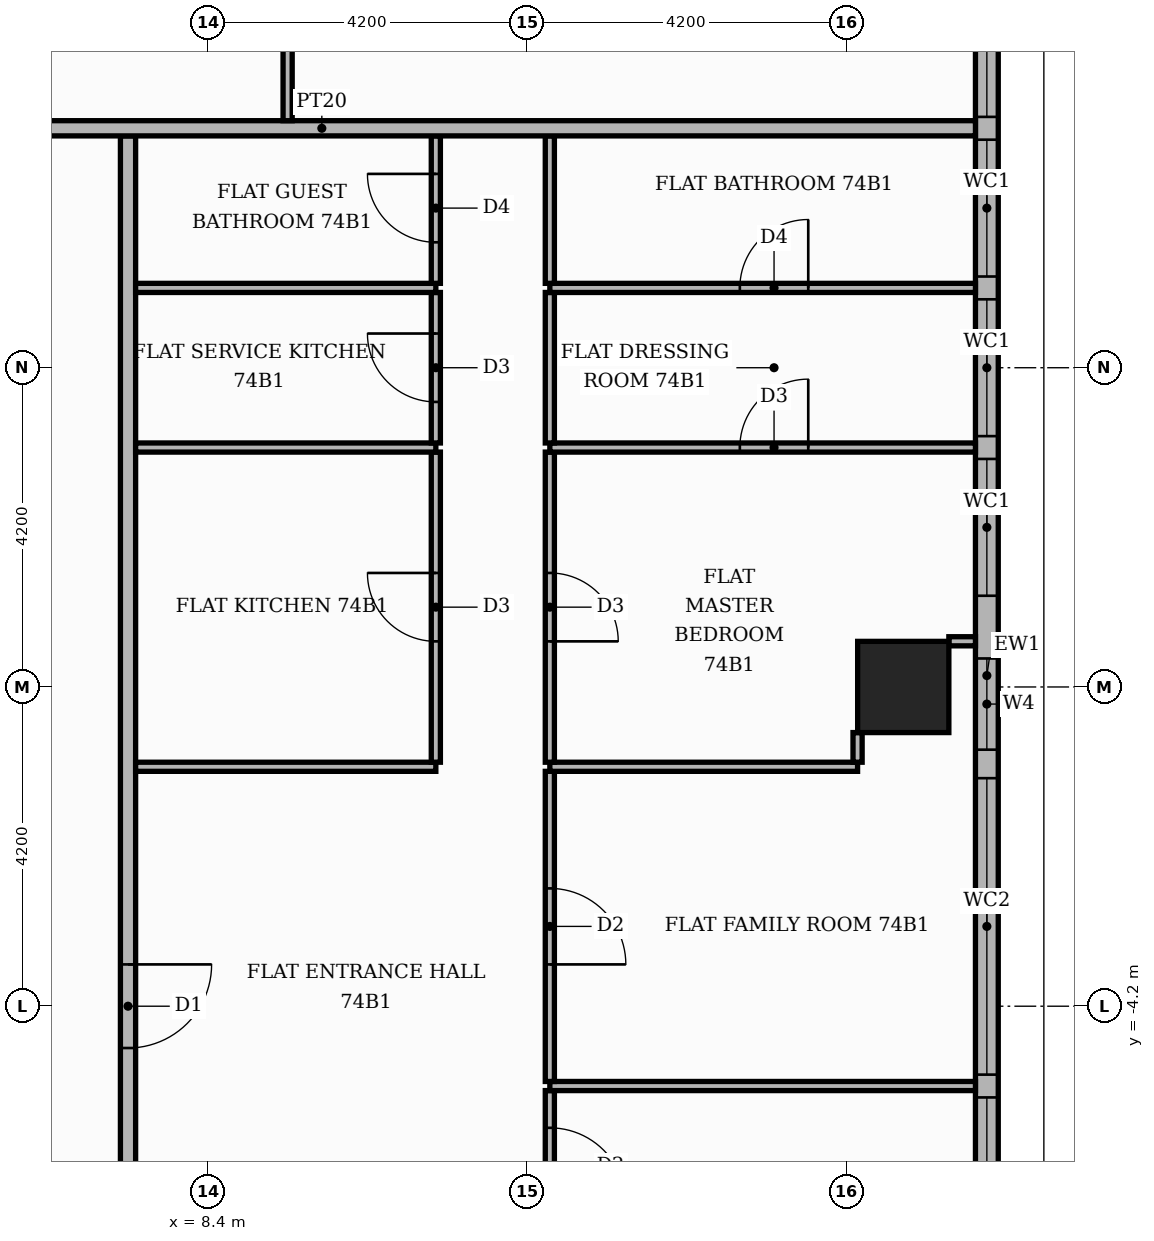
"""IFC4 building model, lengths in metres.
Left out: names, types, materials, properties, quantities, classifications, styles, units other than length and angle.
Written with IfcOpenShell. Run it as: python <this file> out.ifc"""

import sys

from ifc_helpers import new_model, si_unit, direction, frame, frame_2d, origin, origin_2d, place, context, subcontext, project, spatial, rectangle, extrude, element, fill, save


model = new_model("IFC4")
c1 = context("Model", 3, precision=1e-05, world=origin(), true_north=direction((0.0, 1.0)))
c2 = subcontext(c1, "Body", "Model", "MODEL_VIEW")
j1 = project(units=[si_unit("LENGTHUNIT", "METRE"), si_unit("PLANEANGLEUNIT", "RADIAN")], contexts=[c1])
p1 = place(None, origin())
s1 = spatial("IfcSite", under=j1, at=p1, CompositionType="ELEMENT")
p2 = place(p1, origin())
s2 = spatial("IfcBuilding", under=s1, at=p2, CompositionType="ELEMENT")
p3 = place(p2, frame((0.0, 0.0, 308.4)))
s3 = spatial("IfcBuildingStorey", under=s2, at=p3, CompositionType="ELEMENT", Elevation=308.4)
p4 = place(p3, frame((17.55, 0.0, 0.0), z_axis=(0.0, 0.0, 1.0), x_axis=(1.0, 0.0, 0.0)))
e1 = element("IfcColumn", 1, at=p4, inside=s3, PredefinedType="COLUMN", context=c2, shape_type="SweptSolid", body=[
    extrude(rectangle(XDim=1.2, YDim=1.2, at=origin_2d()), origin(), (0.0, 0.0, 1.0), 3.9),
])
p5 = place(p3, frame((18.65, -13.0, 0.0), z_axis=(0.0, 0.0, 1.0), x_axis=(0.0, 1.0, 0.0)))
e2 = element("IfcWall", 2, at=p5, inside=s3, PredefinedType="STANDARD", context=c2, shape_type="SweptSolid", body=[
    extrude(rectangle(XDim=26.3, YDim=0.3, at=frame_2d((13.15, 0.0))), origin(), (0.0, 0.0, 1.0), 3.55),
])
p6 = place(p5, frame((1.6, 0.0, 0.6)))
e3 = element("IfcOpeningElement", 3, at=p6, cuts=e2, PredefinedType="OPENING", context=c2, shape_type="SweptSolid", body=[
    extrude(rectangle(XDim=6.0, YDim=2.4, at=frame_2d((3.0, 1.2))), frame((0.0, 0.16, 0.0), z_axis=(0.0, -1.0, 0.0), x_axis=(1.0, 0.0, 0.0)), (0.0, 0.0, 1.0), 0.32),
])
p7 = place(p5, frame((7.9, 0.0, 0.6)))
e4 = element("IfcOpeningElement", 4, at=p7, cuts=e2, PredefinedType="OPENING", context=c2, shape_type="SweptSolid", body=[
    extrude(rectangle(XDim=3.9, YDim=2.4, at=frame_2d((1.95, 1.2))), frame((0.0, 0.16, 0.0), z_axis=(0.0, -1.0, 0.0), x_axis=(1.0, 0.0, 0.0)), (0.0, 0.0, 1.0), 0.32),
])
p8 = place(p5, frame((14.2, 0.0, 0.6)))
e5 = element("IfcOpeningElement", 5, at=p8, cuts=e2, PredefinedType="OPENING", context=c2, shape_type="SweptSolid", body=[
    extrude(rectangle(XDim=1.8, YDim=2.4, at=frame_2d((0.9, 1.2))), frame((0.0, 0.16, 0.0), z_axis=(0.0, -1.0, 0.0), x_axis=(1.0, 0.0, 0.0)), (0.0, 0.0, 1.0), 0.32),
])
p9 = place(p5, frame((16.3, 0.0, 0.6)))
e6 = element("IfcOpeningElement", 6, at=p9, cuts=e2, PredefinedType="OPENING", context=c2, shape_type="SweptSolid", body=[
    extrude(rectangle(XDim=1.8, YDim=2.4, at=frame_2d((0.9, 1.2))), frame((0.0, 0.16, 0.0), z_axis=(0.0, -1.0, 0.0), x_axis=(1.0, 0.0, 0.0)), (0.0, 0.0, 1.0), 0.32),
])
p10 = place(p5, frame((18.4, 0.0, 0.6)))
e7 = element("IfcOpeningElement", 7, at=p10, cuts=e2, PredefinedType="OPENING", context=c2, shape_type="SweptSolid", body=[
    extrude(rectangle(XDim=1.8, YDim=2.4, at=frame_2d((0.9, 1.2))), frame((0.0, 0.16, 0.0), z_axis=(0.0, -1.0, 0.0), x_axis=(1.0, 0.0, 0.0)), (0.0, 0.0, 1.0), 0.32),
])
p11 = place(p5, frame((20.5, 0.0, 0.6)))
e8 = element("IfcOpeningElement", 8, at=p11, cuts=e2, PredefinedType="OPENING", context=c2, shape_type="SweptSolid", body=[
    extrude(rectangle(XDim=3.9, YDim=2.4, at=frame_2d((1.95, 1.2))), frame((0.0, 0.16, 0.0), z_axis=(0.0, -1.0, 0.0), x_axis=(1.0, 0.0, 0.0)), (0.0, 0.0, 1.0), 0.32),
])
p12 = place(p5, frame((12.175, 0.0, 0.9)))
e9 = element("IfcOpeningElement", 9, at=p12, cuts=e2, PredefinedType="OPENING", context=c2, shape_type="SweptSolid", body=[
    extrude(rectangle(XDim=1.2, YDim=2.1, at=frame_2d((0.6, 1.05))), frame((0.0, 0.16, 0.0), z_axis=(0.0, -1.0, 0.0), x_axis=(1.0, 0.0, 0.0)), (0.0, 0.0, 1.0), 0.32),
])
p13 = place(p3, frame((12.9, -7.29, 0.0), z_axis=(0.0, 0.0, 1.0), x_axis=(0.0, 1.0, 0.0)))
e10 = element("IfcWall", 10, at=p13, inside=s3, PredefinedType="PARTITIONING", context=c2, shape_type="SweptSolid", body=[
    extrude(rectangle(XDim=1.98, YDim=0.12, at=frame_2d((0.99, 0.0))), origin(), (0.0, 0.0, 1.0), 3.55),
])
p14 = place(p13, frame((0.49, 0.0, 0.0)))
e11 = element("IfcOpeningElement", 11, at=p14, cuts=e10, PredefinedType="OPENING", context=c2, shape_type="SweptSolid", body=[
    extrude(rectangle(XDim=1.0, YDim=2.1, at=frame_2d((0.5, 1.05))), frame((0.0, 0.07, 0.0), z_axis=(0.0, -1.0, 0.0), x_axis=(1.0, 0.0, 0.0)), (0.0, 0.0, 1.0), 0.14),
])
p15 = place(p3, frame((7.35, -7.25, 0.0), z_axis=(0.0, 0.0, 1.0), x_axis=(0.0, 1.0, 0.0)))
e12 = element("IfcWall", 12, at=p15, inside=s3, PredefinedType="PARTITIONING", context=c2, shape_type="SweptSolid", body=[
    extrude(rectangle(XDim=14.5, YDim=0.2, at=frame_2d((7.25, 0.0))), origin(), (0.0, 0.0, 1.0), 3.55),
])
p16 = place(p15, frame((2.5, 0.0, 0.0)))
e13 = element("IfcOpeningElement", 13, at=p16, cuts=e12, PredefinedType="OPENING", context=c2, shape_type="SweptSolid", body=[
    extrude(rectangle(XDim=1.1, YDim=2.4, at=frame_2d((0.55, 1.2))), frame((0.0, 0.11, 0.0), z_axis=(0.0, -1.0, 0.0), x_axis=(1.0, 0.0, 0.0)), (0.0, 0.0, 1.0), 0.22),
])
p17 = place(p3, frame((12.9, -5.25, 0.0), z_axis=(0.0, 0.0, 1.0), x_axis=(1.0, 0.0, 0.0)))
e14 = element("IfcWall", 14, at=p17, inside=s3, PredefinedType="PARTITIONING", context=c2, shape_type="SweptSolid", body=[
    extrude(rectangle(XDim=5.6, YDim=0.12, at=frame_2d((2.8, 0.0))), origin(), (0.0, 0.0, 1.0), 3.55),
])
p18 = place(p3, frame((12.9, -5.19, 0.0), z_axis=(0.0, 0.0, 1.0), x_axis=(0.0, 1.0, 0.0)))
e15 = element("IfcWall", 15, at=p18, inside=s3, PredefinedType="PARTITIONING", context=c2, shape_type="SweptSolid", body=[
    extrude(rectangle(XDim=4.08, YDim=0.12, at=frame_2d((2.04, 0.0))), origin(), (0.0, 0.0, 1.0), 3.55),
])
p19 = place(p18, frame((1.54, 0.0, 0.0)))
e16 = element("IfcOpeningElement", 16, at=p19, cuts=e15, PredefinedType="OPENING", context=c2, shape_type="SweptSolid", body=[
    extrude(rectangle(XDim=1.0, YDim=2.1, at=frame_2d((0.5, 1.05))), frame((0.0, 0.07, 0.0), z_axis=(0.0, -1.0, 0.0), x_axis=(1.0, 0.0, 0.0)), (0.0, 0.0, 1.0), 0.14),
])
p20 = place(p3, frame((7.45, -1.05, 0.0), z_axis=(0.0, 0.0, 1.0), x_axis=(1.0, 0.0, 0.0)))
e17 = element("IfcWall", 17, at=p20, inside=s3, PredefinedType="PARTITIONING", context=c2, shape_type="SweptSolid", body=[
    extrude(rectangle(XDim=3.95, YDim=0.12, at=frame_2d((1.975, 0.0))), origin(), (0.0, 0.0, 1.0), 3.55),
])
p21 = place(p3, frame((12.9, -1.05, 0.0), z_axis=(0.0, 0.0, 1.0), x_axis=(1.0, 0.0, 0.0)))
e18 = element("IfcWall", 18, at=p21, inside=s3, PredefinedType="PARTITIONING", context=c2, shape_type="SweptSolid", body=[
    extrude(rectangle(XDim=4.049, YDim=0.12, at=frame_2d((2.024, 0.0))), origin(), (0.0, 0.0, 1.0), 3.55),
])
p22 = place(p3, frame((11.4, -0.99, 0.0), z_axis=(0.0, 0.0, 1.0), x_axis=(0.0, 1.0, 0.0)))
e19 = element("IfcWall", 19, at=p22, inside=s3, PredefinedType="PARTITIONING", context=c2, shape_type="SweptSolid", body=[
    extrude(rectangle(XDim=4.08, YDim=0.12, at=frame_2d((2.04, 0.0))), origin(), (0.0, 0.0, 1.0), 3.55),
])
p23 = place(p22, frame((1.59, 0.0, 0.0)))
e20 = element("IfcOpeningElement", 20, at=p23, cuts=e19, PredefinedType="OPENING", context=c2, shape_type="SweptSolid", body=[
    extrude(rectangle(XDim=0.9, YDim=2.1, at=frame_2d((0.45, 1.05))), frame((0.0, 0.07, 0.0), z_axis=(0.0, -1.0, 0.0), x_axis=(1.0, 0.0, 0.0)), (0.0, 0.0, 1.0), 0.14),
])
p24 = place(p3, frame((12.9, -0.99, 0.0), z_axis=(0.0, 0.0, 1.0), x_axis=(0.0, 1.0, 0.0)))
e21 = element("IfcWall", 21, at=p24, inside=s3, PredefinedType="PARTITIONING", context=c2, shape_type="SweptSolid", body=[
    extrude(rectangle(XDim=4.08, YDim=0.12, at=frame_2d((2.04, 0.0))), origin(), (0.0, 0.0, 1.0), 3.55),
])
p25 = place(p24, frame((1.59, 0.0, 0.0)))
e22 = element("IfcOpeningElement", 22, at=p25, cuts=e21, PredefinedType="OPENING", context=c2, shape_type="SweptSolid", body=[
    extrude(rectangle(XDim=0.9, YDim=2.1, at=frame_2d((0.45, 1.05))), frame((0.0, 0.07, 0.0), z_axis=(0.0, -1.0, 0.0), x_axis=(1.0, 0.0, 0.0)), (0.0, 0.0, 1.0), 0.14),
])
p26 = place(p3, frame((16.949, -0.99, 0.0), z_axis=(0.0, 0.0, 1.0), x_axis=(0.0, 1.0, 0.0)))
e23 = element("IfcWall", 23, at=p26, inside=s3, PredefinedType="PARTITIONING", context=c2, shape_type="SweptSolid", body=[
    extrude(rectangle(XDim=0.39, YDim=0.12, at=frame_2d((0.195, 0.0))), origin(), (0.0, 0.0, 1.0), 3.55),
])
p27 = place(p3, frame((18.15, 0.601, 0.0), z_axis=(0.0, 0.0, 1.0), x_axis=(1.0, 0.0, 0.0)))
e24 = element("IfcWall", 24, at=p27, inside=s3, PredefinedType="PARTITIONING", context=c2, shape_type="SweptSolid", body=[
    extrude(rectangle(XDim=0.35, YDim=0.12, at=frame_2d((0.175, 0.0))), origin(), (0.0, 0.0, 1.0), 3.55),
])
p28 = place(p3, frame((7.45, 3.15, 0.0), z_axis=(0.0, 0.0, 1.0), x_axis=(1.0, 0.0, 0.0)))
e25 = element("IfcWall", 25, at=p28, inside=s3, PredefinedType="PARTITIONING", context=c2, shape_type="SweptSolid", body=[
    extrude(rectangle(XDim=3.95, YDim=0.12, at=frame_2d((1.975, 0.0))), origin(), (0.0, 0.0, 1.0), 3.55),
])
p29 = place(p3, frame((12.9, 3.15, 0.0), z_axis=(0.0, 0.0, 1.0), x_axis=(1.0, 0.0, 0.0)))
e26 = element("IfcWall", 26, at=p29, inside=s3, PredefinedType="PARTITIONING", context=c2, shape_type="SweptSolid", body=[
    extrude(rectangle(XDim=5.6, YDim=0.12, at=frame_2d((2.8, 0.0))), origin(), (0.0, 0.0, 1.0), 3.55),
])
p30 = place(p29, frame((2.5, 0.0, 0.0)))
e27 = element("IfcOpeningElement", 27, at=p30, cuts=e26, PredefinedType="OPENING", context=c2, shape_type="SweptSolid", body=[
    extrude(rectangle(XDim=0.9, YDim=2.1, at=frame_2d((0.45, 1.05))), frame((0.0, 0.07, 0.0), z_axis=(0.0, -1.0, 0.0), x_axis=(1.0, 0.0, 0.0)), (0.0, 0.0, 1.0), 0.14),
])
p31 = place(p3, frame((11.4, 3.21, 0.0), z_axis=(0.0, 0.0, 1.0), x_axis=(0.0, 1.0, 0.0)))
e28 = element("IfcWall", 28, at=p31, inside=s3, PredefinedType="PARTITIONING", context=c2, shape_type="SweptSolid", body=[
    extrude(rectangle(XDim=1.98, YDim=0.12, at=frame_2d((0.99, 0.0))), origin(), (0.0, 0.0, 1.0), 3.55),
])
p32 = place(p31, frame((0.54, 0.0, 0.0)))
e29 = element("IfcOpeningElement", 29, at=p32, cuts=e28, PredefinedType="OPENING", context=c2, shape_type="SweptSolid", body=[
    extrude(rectangle(XDim=0.9, YDim=2.1, at=frame_2d((0.45, 1.05))), frame((0.0, 0.07, 0.0), z_axis=(0.0, -1.0, 0.0), x_axis=(1.0, 0.0, 0.0)), (0.0, 0.0, 1.0), 0.14),
])
p33 = place(p3, frame((12.9, 3.21, 0.0), z_axis=(0.0, 0.0, 1.0), x_axis=(0.0, 1.0, 0.0)))
e30 = element("IfcWall", 30, at=p33, inside=s3, PredefinedType="PARTITIONING", context=c2, shape_type="SweptSolid", body=[
    extrude(rectangle(XDim=1.98, YDim=0.12, at=frame_2d((0.99, 0.0))), origin(), (0.0, 0.0, 1.0), 3.55),
])
p34 = place(p3, frame((7.45, 5.25, 0.0), z_axis=(0.0, 0.0, 1.0), x_axis=(1.0, 0.0, 0.0)))
e31 = element("IfcWall", 31, at=p34, inside=s3, PredefinedType="PARTITIONING", context=c2, shape_type="SweptSolid", body=[
    extrude(rectangle(XDim=3.95, YDim=0.12, at=frame_2d((1.975, 0.0))), origin(), (0.0, 0.0, 1.0), 3.55),
])
p35 = place(p3, frame((12.9, 5.25, 0.0), z_axis=(0.0, 0.0, 1.0), x_axis=(1.0, 0.0, 0.0)))
e32 = element("IfcWall", 32, at=p35, inside=s3, PredefinedType="PARTITIONING", context=c2, shape_type="SweptSolid", body=[
    extrude(rectangle(XDim=5.6, YDim=0.12, at=frame_2d((2.8, 0.0))), origin(), (0.0, 0.0, 1.0), 3.55),
])
p36 = place(p35, frame((2.5, 0.0, 0.0)))
e33 = element("IfcOpeningElement", 33, at=p36, cuts=e32, PredefinedType="OPENING", context=c2, shape_type="SweptSolid", body=[
    extrude(rectangle(XDim=0.9, YDim=2.1, at=frame_2d((0.45, 1.05))), frame((0.0, 0.07, 0.0), z_axis=(0.0, -1.0, 0.0), x_axis=(1.0, 0.0, 0.0)), (0.0, 0.0, 1.0), 0.14),
])
p37 = place(p3, frame((11.4, 5.31, 0.0), z_axis=(0.0, 0.0, 1.0), x_axis=(0.0, 1.0, 0.0)))
e34 = element("IfcWall", 34, at=p37, inside=s3, PredefinedType="PARTITIONING", context=c2, shape_type="SweptSolid", body=[
    extrude(rectangle(XDim=1.94, YDim=0.12, at=frame_2d((0.97, 0.0))), origin(), (0.0, 0.0, 1.0), 3.55),
])
p38 = place(p37, frame((0.54, 0.0, 0.0)))
e35 = element("IfcOpeningElement", 35, at=p38, cuts=e34, PredefinedType="OPENING", context=c2, shape_type="SweptSolid", body=[
    extrude(rectangle(XDim=0.9, YDim=2.1, at=frame_2d((0.45, 1.05))), frame((0.0, 0.07, 0.0), z_axis=(0.0, -1.0, 0.0), x_axis=(1.0, 0.0, 0.0)), (0.0, 0.0, 1.0), 0.14),
])
p39 = place(p3, frame((12.9, 5.31, 0.0), z_axis=(0.0, 0.0, 1.0), x_axis=(0.0, 1.0, 0.0)))
e36 = element("IfcWall", 36, at=p39, inside=s3, PredefinedType="PARTITIONING", context=c2, shape_type="SweptSolid", body=[
    extrude(rectangle(XDim=1.94, YDim=0.12, at=frame_2d((0.97, 0.0))), origin(), (0.0, 0.0, 1.0), 3.55),
])
p40 = place(p3, frame((1.3, 7.35, 0.0), z_axis=(0.0, 0.0, 1.0), x_axis=(1.0, 0.0, 0.0)))
e37 = element("IfcWall", 37, at=p40, inside=s3, PredefinedType="PARTITIONING", context=c2, shape_type="SweptSolid", body=[
    extrude(rectangle(XDim=17.2, YDim=0.2, at=frame_2d((8.6, 0.0))), origin(), (0.0, 0.0, 1.0), 3.55),
])
p41 = place(p40, frame((3.4, 0.0, 0.0)))
e38 = element("IfcOpeningElement", 38, at=p41, cuts=e37, PredefinedType="OPENING", context=c2, shape_type="SweptSolid", body=[
    extrude(rectangle(XDim=1.1, YDim=2.4, at=frame_2d((0.55, 1.2))), frame((0.0, 0.11, 0.0), z_axis=(0.0, -1.0, 0.0), x_axis=(1.0, 0.0, 0.0)), (0.0, 0.0, 1.0), 0.22),
])
p42 = place(p3, frame((9.45, 7.45, 0.0), z_axis=(0.0, 0.0, 1.0), x_axis=(0.0, 1.0, 0.0)))
e39 = element("IfcWall", 39, at=p42, inside=s3, PredefinedType="PARTITIONING", context=c2, shape_type="SweptSolid", body=[
    extrude(rectangle(XDim=6.29, YDim=0.12, at=frame_2d((3.145, 0.0))), origin(), (0.0, 0.0, 1.0), 3.55),
])
p43 = place(p42, frame((2.675, 0.0, 0.0)))
e40 = element("IfcOpeningElement", 40, at=p43, cuts=e39, PredefinedType="OPENING", context=c2, shape_type="SweptSolid", body=[
    extrude(rectangle(XDim=0.9, YDim=2.1, at=frame_2d((0.45, 1.05))), frame((0.0, 0.07, 0.0), z_axis=(0.0, -1.0, 0.0), x_axis=(1.0, 0.0, 0.0)), (0.0, 0.0, 1.0), 0.14),
])
p44 = place(p6, origin())
e41 = element("IfcWindow", 41, at=p44, inside=s3, PartitioningType="SINGLE_PANEL", PredefinedType="WINDOW", context=c2, shape_type="SweptSolid", body=[
    extrude(rectangle(XDim=6.0, YDim=2.4, at=frame_2d((3.0, 1.2))), frame((0.0, 0.03, 0.0), z_axis=(0.0, -1.0, 0.0), x_axis=(1.0, 0.0, 0.0)), (0.0, 0.0, 1.0), 0.06),
])
fill(e3, e41)
p45 = place(p7, origin())
e42 = element("IfcWindow", 42, at=p45, inside=s3, PartitioningType="SINGLE_PANEL", PredefinedType="WINDOW", context=c2, shape_type="SweptSolid", body=[
    extrude(rectangle(XDim=3.9, YDim=2.4, at=frame_2d((1.95, 1.2))), frame((0.0, 0.03, 0.0), z_axis=(0.0, -1.0, 0.0), x_axis=(1.0, 0.0, 0.0)), (0.0, 0.0, 1.0), 0.06),
])
fill(e4, e42)
p46 = place(p8, origin())
e43 = element("IfcWindow", 43, at=p46, inside=s3, PartitioningType="SINGLE_PANEL", PredefinedType="WINDOW", context=c2, shape_type="SweptSolid", body=[
    extrude(rectangle(XDim=1.8, YDim=2.4, at=frame_2d((0.9, 1.2))), frame((0.0, 0.03, 0.0), z_axis=(0.0, -1.0, 0.0), x_axis=(1.0, 0.0, 0.0)), (0.0, 0.0, 1.0), 0.06),
])
fill(e5, e43)
p47 = place(p9, origin())
e44 = element("IfcWindow", 44, at=p47, inside=s3, PartitioningType="SINGLE_PANEL", PredefinedType="WINDOW", context=c2, shape_type="SweptSolid", body=[
    extrude(rectangle(XDim=1.8, YDim=2.4, at=frame_2d((0.9, 1.2))), frame((0.0, 0.03, 0.0), z_axis=(0.0, -1.0, 0.0), x_axis=(1.0, 0.0, 0.0)), (0.0, 0.0, 1.0), 0.06),
])
fill(e6, e44)
p48 = place(p10, origin())
e45 = element("IfcWindow", 45, at=p48, inside=s3, PartitioningType="SINGLE_PANEL", PredefinedType="WINDOW", context=c2, shape_type="SweptSolid", body=[
    extrude(rectangle(XDim=1.8, YDim=2.4, at=frame_2d((0.9, 1.2))), frame((0.0, 0.03, 0.0), z_axis=(0.0, -1.0, 0.0), x_axis=(1.0, 0.0, 0.0)), (0.0, 0.0, 1.0), 0.06),
])
fill(e7, e45)
p49 = place(p11, origin())
e46 = element("IfcWindow", 46, at=p49, inside=s3, PartitioningType="SINGLE_PANEL", PredefinedType="WINDOW", context=c2, shape_type="SweptSolid", body=[
    extrude(rectangle(XDim=3.9, YDim=2.4, at=frame_2d((1.95, 1.2))), frame((0.0, 0.03, 0.0), z_axis=(0.0, -1.0, 0.0), x_axis=(1.0, 0.0, 0.0)), (0.0, 0.0, 1.0), 0.06),
])
fill(e8, e46)
p50 = place(p12, origin())
e47 = element("IfcWindow", 47, at=p50, inside=s3, PartitioningType="SINGLE_PANEL", PredefinedType="WINDOW", context=c2, shape_type="SweptSolid", body=[
    extrude(rectangle(XDim=1.2, YDim=2.1, at=frame_2d((0.6, 1.05))), frame((0.0, 0.03, 0.0), z_axis=(0.0, -1.0, 0.0), x_axis=(1.0, 0.0, 0.0)), (0.0, 0.0, 1.0), 0.06),
])
fill(e9, e47)
p51 = place(p16, frame((1.1, 0.0, 0.0), z_axis=(0.0, 0.0, 1.0), x_axis=(-1.0, 0.0, 0.0)))
e48 = element("IfcDoor", 48, at=p51, inside=s3, OperationType="SINGLE_SWING_RIGHT", PredefinedType="DOOR", context=c2, shape_type="SweptSolid", body=[
    extrude(rectangle(XDim=1.1, YDim=2.4, at=frame_2d((0.55, 1.2))), frame((0.0, 0.025, 0.0), z_axis=(0.0, -1.0, 0.0), x_axis=(1.0, 0.0, 0.0)), (0.0, 0.0, 1.0), 0.05),
])
fill(e13, e48)
p52 = place(p23, origin())
e49 = element("IfcDoor", 49, at=p52, inside=s3, OperationType="SINGLE_SWING_RIGHT", PredefinedType="DOOR", context=c2, shape_type="SweptSolid", body=[
    extrude(rectangle(XDim=0.9, YDim=2.1, at=frame_2d((0.45, 1.05))), frame((0.0, 0.025, 0.0), z_axis=(0.0, -1.0, 0.0), x_axis=(1.0, 0.0, 0.0)), (0.0, 0.0, 1.0), 0.05),
])
fill(e20, e49)
p53 = place(p32, origin())
e50 = element("IfcDoor", 50, at=p53, inside=s3, OperationType="SINGLE_SWING_RIGHT", PredefinedType="DOOR", context=c2, shape_type="SweptSolid", body=[
    extrude(rectangle(XDim=0.9, YDim=2.1, at=frame_2d((0.45, 1.05))), frame((0.0, 0.025, 0.0), z_axis=(0.0, -1.0, 0.0), x_axis=(1.0, 0.0, 0.0)), (0.0, 0.0, 1.0), 0.05),
])
fill(e29, e50)
p54 = place(p38, origin())
e51 = element("IfcDoor", 51, at=p54, inside=s3, OperationType="SINGLE_SWING_RIGHT", PredefinedType="DOOR", context=c2, shape_type="SweptSolid", body=[
    extrude(rectangle(XDim=0.9, YDim=2.1, at=frame_2d((0.45, 1.05))), frame((0.0, 0.025, 0.0), z_axis=(0.0, -1.0, 0.0), x_axis=(1.0, 0.0, 0.0)), (0.0, 0.0, 1.0), 0.05),
])
fill(e35, e51)
p55 = place(p14, frame((1.0, 0.0, 0.0), z_axis=(0.0, 0.0, 1.0), x_axis=(-1.0, 0.0, 0.0)))
e52 = element("IfcDoor", 52, at=p55, inside=s3, OperationType="SINGLE_SWING_LEFT", PredefinedType="DOOR", context=c2, shape_type="SweptSolid", body=[
    extrude(rectangle(XDim=1.0, YDim=2.1, at=frame_2d((0.5, 1.05))), frame((0.0, 0.025, 0.0), z_axis=(0.0, -1.0, 0.0), x_axis=(1.0, 0.0, 0.0)), (0.0, 0.0, 1.0), 0.05),
])
fill(e11, e52)
p56 = place(p19, frame((1.0, 0.0, 0.0), z_axis=(0.0, 0.0, 1.0), x_axis=(-1.0, 0.0, 0.0)))
e53 = element("IfcDoor", 53, at=p56, inside=s3, OperationType="SINGLE_SWING_LEFT", PredefinedType="DOOR", context=c2, shape_type="SweptSolid", body=[
    extrude(rectangle(XDim=1.0, YDim=2.1, at=frame_2d((0.5, 1.05))), frame((0.0, 0.025, 0.0), z_axis=(0.0, -1.0, 0.0), x_axis=(1.0, 0.0, 0.0)), (0.0, 0.0, 1.0), 0.05),
])
fill(e16, e53)
p57 = place(p25, frame((0.9, 0.0, 0.0), z_axis=(0.0, 0.0, 1.0), x_axis=(-1.0, 0.0, 0.0)))
e54 = element("IfcDoor", 54, at=p57, inside=s3, OperationType="SINGLE_SWING_LEFT", PredefinedType="DOOR", context=c2, shape_type="SweptSolid", body=[
    extrude(rectangle(XDim=0.9, YDim=2.1, at=frame_2d((0.45, 1.05))), frame((0.0, 0.025, 0.0), z_axis=(0.0, -1.0, 0.0), x_axis=(1.0, 0.0, 0.0)), (0.0, 0.0, 1.0), 0.05),
])
fill(e22, e54)
p58 = place(p30, origin())
e55 = element("IfcDoor", 55, at=p58, inside=s3, OperationType="SINGLE_SWING_RIGHT", PredefinedType="DOOR", context=c2, shape_type="SweptSolid", body=[
    extrude(rectangle(XDim=0.9, YDim=2.1, at=frame_2d((0.45, 1.05))), frame((0.0, 0.025, 0.0), z_axis=(0.0, -1.0, 0.0), x_axis=(1.0, 0.0, 0.0)), (0.0, 0.0, 1.0), 0.05),
])
fill(e27, e55)
p59 = place(p36, origin())
e56 = element("IfcDoor", 56, at=p59, inside=s3, OperationType="SINGLE_SWING_RIGHT", PredefinedType="DOOR", context=c2, shape_type="SweptSolid", body=[
    extrude(rectangle(XDim=0.9, YDim=2.1, at=frame_2d((0.45, 1.05))), frame((0.0, 0.025, 0.0), z_axis=(0.0, -1.0, 0.0), x_axis=(1.0, 0.0, 0.0)), (0.0, 0.0, 1.0), 0.05),
])
fill(e33, e56)
save(model, sys.argv[1])
